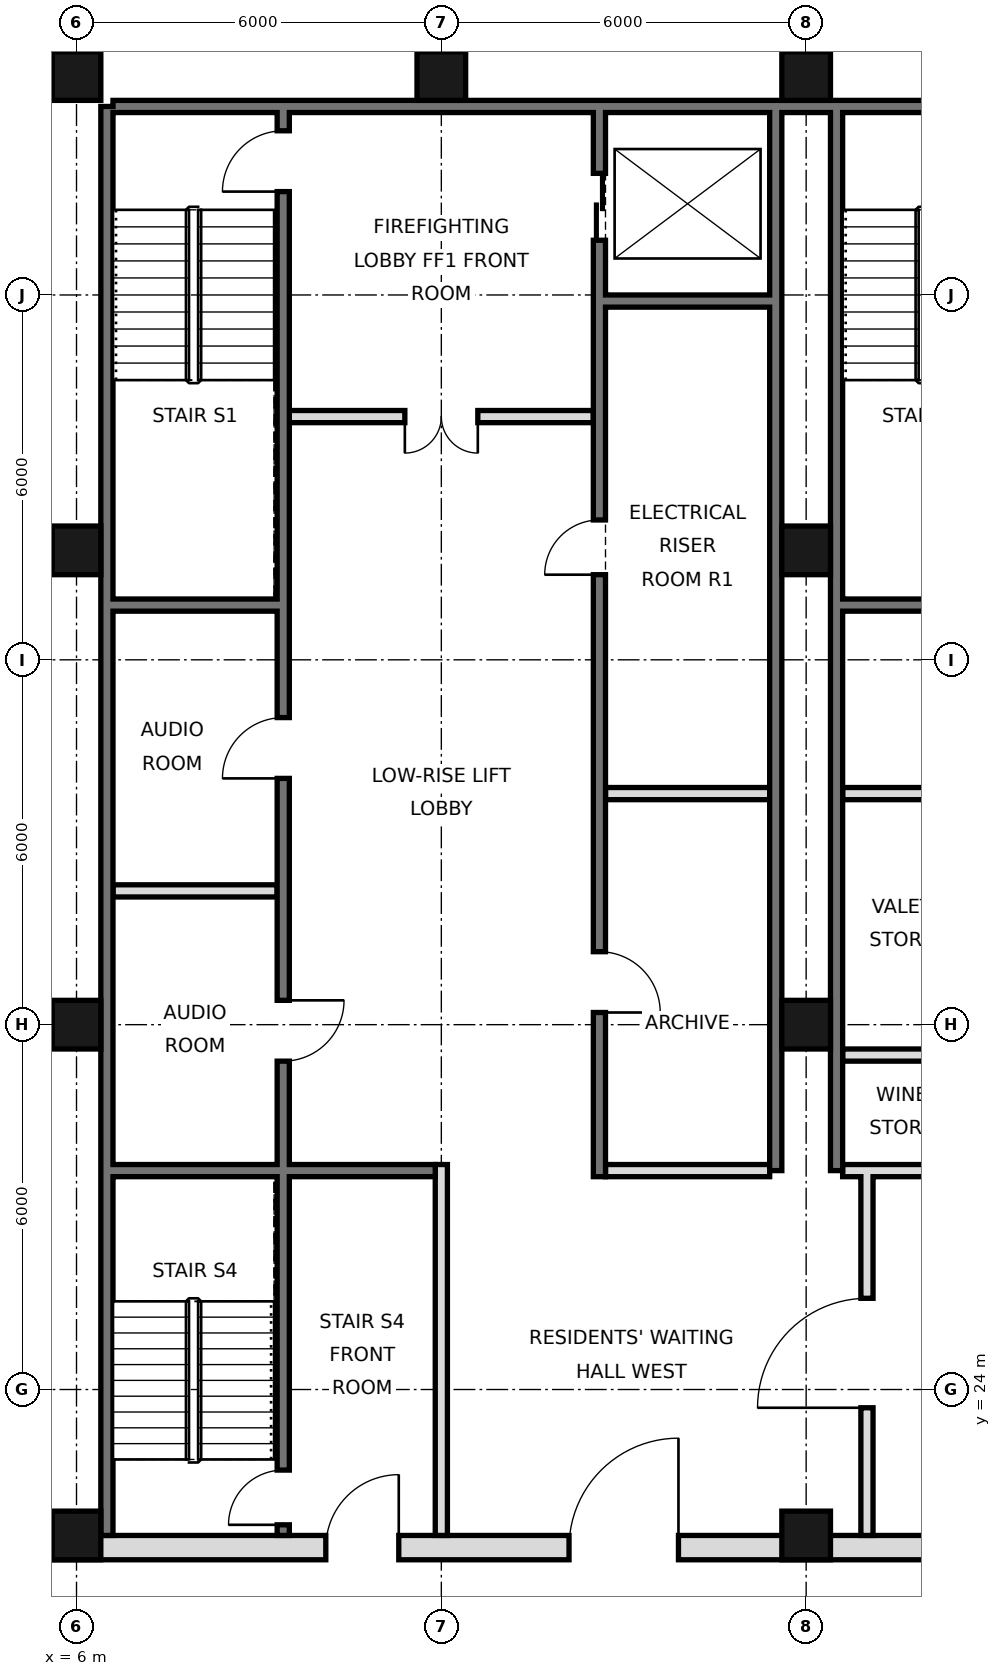
"""IFC4 building model, lengths in metres.
Left out: names, types, materials, properties, quantities, classifications, styles, units other than length and angle.
Written with IfcOpenShell. Run it as: python <this file> out.ifc"""

import sys

from ifc_helpers import new_model, si_unit, direction, frame, frame_2d, origin, origin_2d, place, context, subcontext, project, spatial, rectangle, hollow_rectangle, extrude, element, fill, save


model = new_model("IFC4")
c1 = context("Model", 3, precision=1e-05, world=origin(), true_north=direction((0.0, 1.0)))
c2 = subcontext(c1, "Body", "Model", "MODEL_VIEW")
j1 = project(units=[si_unit("LENGTHUNIT", "METRE"), si_unit("PLANEANGLEUNIT", "RADIAN")], contexts=[c1])
p1 = place(None, origin())
s1 = spatial("IfcSite", under=j1, at=p1, CompositionType="ELEMENT")
p2 = place(p1, origin())
s2 = spatial("IfcBuilding", under=s1, at=p2, CompositionType="ELEMENT")
p3 = place(p2, frame((0.0, 0.0, 305.2)))
s3 = spatial("IfcBuildingStorey", under=s2, at=p3, CompositionType="ELEMENT", Elevation=305.2)
for number, where, z_axis, x_axis in (
    (1, (6.0, 21.6, 0.0), (0.0, 0.0, 1.0), (1.0, 0.0, 0.0)),
    (2, (6.0, 30.0, 0.0), (0.0, 0.0, 1.0), (1.0, 0.0, 0.0)),
    (3, (6.0, 37.8, 0.0), (0.0, 0.0, 1.0), (1.0, 0.0, 0.0)),
    (4, (6.0, 45.6, 0.0), (0.0, 0.0, 1.0), (1.0, 0.0, 0.0)),
    (5, (12.0, 45.6, 0.0), (0.0, 0.0, 1.0), (1.0, 0.0, 0.0)),
    (6, (18.0, 21.6, 0.0), (0.0, 0.0, 1.0), (1.0, 0.0, 0.0)),
    (7, (18.0, 30.0, 0.0), (0.0, 0.0, 1.0), (1.0, 0.0, 0.0)),
    (8, (18.0, 37.8, 0.0), (0.0, 0.0, 1.0), (1.0, 0.0, 0.0)),
    (9, (18.0, 45.6, 0.0), (0.0, 0.0, 1.0), (1.0, 0.0, 0.0)),
):
    element("IfcColumn", number, at=place(p3, frame(where, z_axis=z_axis, x_axis=x_axis)), inside=s3, PredefinedType="COLUMN", context=c2, shape_type="SweptSolid", body=[
        extrude(hollow_rectangle(XDim=0.8, YDim=0.8, WallThickness=0.025, at=origin_2d()), origin(), (0.0, 0.0, 1.0), 3.6),
    ])
p4 = place(p3, frame((6.5, 21.6, 0.0), z_axis=(0.0, 0.0, 1.0), x_axis=(0.0, 1.0, 0.0)))
e10 = element("IfcWall", 10, at=p4, inside=s3, PredefinedType="SOLIDWALL", context=c2, shape_type="SweptSolid", body=[
    extrude(rectangle(XDim=23.5, YDim=0.2, at=frame_2d((11.75, 0.0))), origin(), (0.0, 0.0, 1.0), 3.42),
])
p5 = place(p3, frame((6.6, 45.1, 0.0), z_axis=(0.0, 0.0, 1.0), x_axis=(1.0, 0.0, 0.0)))
e11 = element("IfcWall", 11, at=p5, inside=s3, PredefinedType="SOLIDWALL", context=c2, shape_type="SweptSolid", body=[
    extrude(rectangle(XDim=34.8, YDim=0.2, at=frame_2d((17.4, 0.0))), origin(), (0.0, 0.0, 1.0), 3.42),
])
for number, where, z_axis, x_axis in (
    (12, (17.5, 27.6, 0.0), (0.0, 0.0, 1.0), (0.0, 1.0, 0.0)),
    (13, (18.5, 27.6, 0.0), (0.0, 0.0, 1.0), (0.0, 1.0, 0.0)),
):
    element("IfcWall", number, at=place(p3, frame(where, z_axis=z_axis, x_axis=x_axis)), inside=s3, PredefinedType="SOLIDWALL", context=c2, shape_type="SweptSolid", body=[
        extrude(rectangle(XDim=17.5, YDim=0.2, at=frame_2d((8.75, 0.0))), origin(), (0.0, 0.0, 1.0), 3.42),
    ])
p6 = place(p3, frame((5.6, 21.4, 0.0), z_axis=(0.0, 0.0, 1.0), x_axis=(1.0, 0.0, 0.0)))
e14 = element("IfcWall", 14, at=p6, inside=s3, PredefinedType="SOLIDWALL", context=c2, shape_type="SweptSolid", body=[
    extrude(rectangle(XDim=36.8, YDim=0.4, at=frame_2d((18.4, 0.0))), origin(), (0.0, 0.0, 1.0), 3.42),
])
p7 = place(p6, frame((8.5, 0.0, 0.0)))
e15 = element("IfcOpeningElement", 15, at=p7, cuts=e14, PredefinedType="OPENING", context=c2, shape_type="SweptSolid", body=[
    extrude(rectangle(XDim=1.8, YDim=2.1, at=frame_2d((0.9, 1.05))), frame((0.0, 0.21, 0.0), z_axis=(0.0, -1.0, 0.0), x_axis=(1.0, 0.0, 0.0)), (0.0, 0.0, 1.0), 0.42),
])
p8 = place(p6, frame((17.5, 0.0, 0.0)))
e16 = element("IfcOpeningElement", 16, at=p8, cuts=e14, PredefinedType="OPENING", context=c2, shape_type="SweptSolid", body=[
    extrude(rectangle(XDim=1.8, YDim=2.1, at=frame_2d((0.9, 1.05))), frame((0.0, 0.21, 0.0), z_axis=(0.0, -1.0, 0.0), x_axis=(1.0, 0.0, 0.0)), (0.0, 0.0, 1.0), 0.42),
])
p9 = place(p6, frame((26.5, 0.0, 0.0)))
e17 = element("IfcOpeningElement", 17, at=p9, cuts=e14, PredefinedType="OPENING", context=c2, shape_type="SweptSolid", body=[
    extrude(rectangle(XDim=1.8, YDim=2.1, at=frame_2d((0.9, 1.05))), frame((0.0, 0.21, 0.0), z_axis=(0.0, -1.0, 0.0), x_axis=(1.0, 0.0, 0.0)), (0.0, 0.0, 1.0), 0.42),
])
p10 = place(p6, frame((4.5, 0.0, 0.0)))
e18 = element("IfcOpeningElement", 18, at=p10, cuts=e14, PredefinedType="OPENING", context=c2, shape_type="SweptSolid", body=[
    extrude(rectangle(XDim=1.2, YDim=2.1, at=frame_2d((0.6, 1.05))), frame((0.0, 0.21, 0.0), z_axis=(0.0, -1.0, 0.0), x_axis=(1.0, 0.0, 0.0)), (0.0, 0.0, 1.0), 0.42),
])
p11 = place(p6, frame((31.1, 0.0, 0.0)))
e19 = element("IfcOpeningElement", 19, at=p11, cuts=e14, PredefinedType="OPENING", context=c2, shape_type="SweptSolid", body=[
    extrude(rectangle(XDim=1.2, YDim=2.1, at=frame_2d((0.6, 1.05))), frame((0.0, 0.21, 0.0), z_axis=(0.0, -1.0, 0.0), x_axis=(1.0, 0.0, 0.0)), (0.0, 0.0, 1.0), 0.42),
])
p12 = place(p3, frame((19.0, 21.6, 0.0), z_axis=(0.0, 0.0, 1.0), x_axis=(0.0, 1.0, 0.0)))
e20 = element("IfcWall", 20, at=p12, inside=s3, PredefinedType="PARTITIONING", context=c2, shape_type="SweptSolid", body=[
    extrude(rectangle(XDim=6.0, YDim=0.2, at=frame_2d((3.0, 0.0))), origin(), (0.0, 0.0, 1.0), 3.42),
])
p13 = place(p12, frame((2.1, 0.0, 0.0)))
e21 = element("IfcOpeningElement", 21, at=p13, cuts=e20, PredefinedType="OPENING", context=c2, shape_type="SweptSolid", body=[
    extrude(rectangle(XDim=1.8, YDim=2.1, at=frame_2d((0.9, 1.05))), frame((0.0, 0.11, 0.0), z_axis=(0.0, -1.0, 0.0), x_axis=(1.0, 0.0, 0.0)), (0.0, 0.0, 1.0), 0.22),
])
p14 = place(p3, frame((12.0, 21.6, 0.0), z_axis=(0.0, 0.0, 1.0), x_axis=(0.0, 1.0, 0.0)))
e22 = element("IfcWall", 22, at=p14, inside=s3, PredefinedType="PARTITIONING", context=c2, shape_type="SweptSolid", body=[
    extrude(rectangle(XDim=6.1, YDim=0.2, at=frame_2d((3.05, 0.0))), origin(), (0.0, 0.0, 1.0), 3.42),
])
p15 = place(p3, frame((14.6, 27.5, 0.0), z_axis=(0.0, 0.0, 1.0), x_axis=(0.0, 1.0, 0.0)))
e23 = element("IfcWall", 23, at=p15, inside=s3, PredefinedType="SOLIDWALL", context=c2, shape_type="SweptSolid", body=[
    extrude(rectangle(XDim=17.5, YDim=0.2, at=frame_2d((8.75, 0.0))), origin(), (0.0, 0.0, 1.0), 3.42),
])
p16 = place(p15, frame((15.4, 0.0, 0.0)))
e24 = element("IfcOpeningElement", 24, at=p16, cuts=e23, PredefinedType="OPENING", context=c2, shape_type="SweptSolid", body=[
    extrude(rectangle(XDim=1.1, YDim=2.1, at=frame_2d((0.55, 1.05))), frame((0.0, 0.11, 0.0), z_axis=(0.0, -1.0, 0.0), x_axis=(1.0, 0.0, 0.0)), (0.0, 0.0, 1.0), 0.22),
])
p17 = place(p15, frame((2.7, 0.0, 0.0)))
e25 = element("IfcOpeningElement", 25, at=p17, cuts=e23, PredefinedType="OPENING", context=c2, shape_type="SweptSolid", body=[
    extrude(rectangle(XDim=1.0, YDim=2.1, at=frame_2d((0.5, 1.05))), frame((0.0, 0.11, 0.0), z_axis=(0.0, -1.0, 0.0), x_axis=(1.0, 0.0, 0.0)), (0.0, 0.0, 1.0), 0.22),
])
p18 = place(p15, frame((9.9, 0.0, 0.0)))
e26 = element("IfcOpeningElement", 26, at=p18, cuts=e23, PredefinedType="OPENING", context=c2, shape_type="SweptSolid", body=[
    extrude(rectangle(XDim=0.9, YDim=2.1, at=frame_2d((0.45, 1.05))), frame((0.0, 0.11, 0.0), z_axis=(0.0, -1.0, 0.0), x_axis=(1.0, 0.0, 0.0)), (0.0, 0.0, 1.0), 0.22),
])
p19 = place(p3, frame((9.4, 21.6, 0.0), z_axis=(0.0, 0.0, 1.0), x_axis=(0.0, 1.0, 0.0)))
e27 = element("IfcWall", 27, at=p19, inside=s3, PredefinedType="SOLIDWALL", context=c2, shape_type="SweptSolid", body=[
    extrude(rectangle(XDim=23.4, YDim=0.2, at=frame_2d((11.7, 0.0))), origin(), (0.0, 0.0, 1.0), 3.42),
])
p20 = place(p19, frame((7.8, 0.0, 0.0)))
e28 = element("IfcOpeningElement", 28, at=p20, cuts=e27, PredefinedType="OPENING", context=c2, shape_type="SweptSolid", body=[
    extrude(rectangle(XDim=1.0, YDim=2.1, at=frame_2d((0.5, 1.05))), frame((0.0, 0.11, 0.0), z_axis=(0.0, -1.0, 0.0), x_axis=(1.0, 0.0, 0.0)), (0.0, 0.0, 1.0), 0.22),
])
p21 = place(p19, frame((12.45, 0.0, 0.0)))
e29 = element("IfcOpeningElement", 29, at=p21, cuts=e27, PredefinedType="OPENING", context=c2, shape_type="SweptSolid", body=[
    extrude(rectangle(XDim=1.0, YDim=2.1, at=frame_2d((0.5, 1.05))), frame((0.0, 0.11, 0.0), z_axis=(0.0, -1.0, 0.0), x_axis=(1.0, 0.0, 0.0)), (0.0, 0.0, 1.0), 0.22),
])
p22 = place(p19, frame((22.1, 0.0, 0.0)))
e30 = element("IfcOpeningElement", 30, at=p22, cuts=e27, PredefinedType="OPENING", context=c2, shape_type="SweptSolid", body=[
    extrude(rectangle(XDim=1.0, YDim=2.1, at=frame_2d((0.5, 1.05))), frame((0.0, 0.11, 0.0), z_axis=(0.0, -1.0, 0.0), x_axis=(1.0, 0.0, 0.0)), (0.0, 0.0, 1.0), 0.22),
])
p23 = place(p19, frame((0.175, 0.0, 0.0)))
e31 = element("IfcOpeningElement", 31, at=p23, cuts=e27, PredefinedType="OPENING", context=c2, shape_type="SweptSolid", body=[
    extrude(rectangle(XDim=0.9, YDim=2.1, at=frame_2d((0.45, 1.05))), frame((0.0, 0.11, 0.0), z_axis=(0.0, -1.0, 0.0), x_axis=(1.0, 0.0, 0.0)), (0.0, 0.0, 1.0), 0.22),
])
for number, where, z_axis, x_axis in (
    (32, (14.7, 27.6, 0.0), (0.0, 0.0, 1.0), (1.0, 0.0, 0.0)),
    (33, (18.6, 27.6, 0.0), (0.0, 0.0, 1.0), (1.0, 0.0, 0.0)),
):
    element("IfcWall", number, at=place(p3, frame(where, z_axis=z_axis, x_axis=x_axis)), inside=s3, PredefinedType="PARTITIONING", context=c2, shape_type="SweptSolid", body=[
        extrude(rectangle(XDim=2.7, YDim=0.2, at=frame_2d((1.35, 0.0))), origin(), (0.0, 0.0, 1.0), 3.42),
    ])
p24 = place(p3, frame((6.6, 27.6, 0.0), z_axis=(0.0, 0.0, 1.0), x_axis=(1.0, 0.0, 0.0)))
e34 = element("IfcWall", 34, at=p24, inside=s3, PredefinedType="SOLIDWALL", context=c2, shape_type="SweptSolid", body=[
    extrude(rectangle(XDim=5.3, YDim=0.2, at=frame_2d((2.65, 0.0))), origin(), (0.0, 0.0, 1.0), 3.42),
])
for number, where, z_axis, x_axis in (
    (35, (18.6, 29.5, 0.0), (0.0, 0.0, 1.0), (1.0, 0.0, 0.0)),
    (36, (6.6, 32.2, 0.0), (0.0, 0.0, 1.0), (1.0, 0.0, 0.0)),
):
    element("IfcWall", number, at=place(p3, frame(where, z_axis=z_axis, x_axis=x_axis)), inside=s3, PredefinedType="PARTITIONING", context=c2, shape_type="SweptSolid", body=[
        extrude(rectangle(XDim=2.7, YDim=0.2, at=frame_2d((1.35, 0.0))), origin(), (0.0, 0.0, 1.0), 3.42),
    ])
for number, where, z_axis, x_axis in (
    (37, (14.7, 33.8, 0.0), (0.0, 0.0, 1.0), (1.0, 0.0, 0.0)),
    (38, (18.6, 33.8, 0.0), (0.0, 0.0, 1.0), (1.0, 0.0, 0.0)),
    (39, (18.6, 36.9, 0.0), (0.0, 0.0, 1.0), (1.0, 0.0, 0.0)),
    (40, (6.6, 36.9, 0.0), (0.0, 0.0, 1.0), (1.0, 0.0, 0.0)),
):
    element("IfcWall", number, at=place(p3, frame(where, z_axis=z_axis, x_axis=x_axis)), inside=s3, PredefinedType="SOLIDWALL", context=c2, shape_type="SweptSolid", body=[
        extrude(rectangle(XDim=2.7, YDim=0.2, at=frame_2d((1.35, 0.0))), origin(), (0.0, 0.0, 1.0), 3.42),
    ])
p25 = place(p3, frame((9.5, 40.0, 0.0), z_axis=(0.0, 0.0, 1.0), x_axis=(1.0, 0.0, 0.0)))
e41 = element("IfcWall", 41, at=p25, inside=s3, PredefinedType="PARTITIONING", context=c2, shape_type="SweptSolid", body=[
    extrude(rectangle(XDim=5.0, YDim=0.2, at=frame_2d((2.5, 0.0))), origin(), (0.0, 0.0, 1.0), 3.42),
])
p26 = place(p25, frame((1.9, 0.0, 0.0)))
e42 = element("IfcOpeningElement", 42, at=p26, cuts=e41, PredefinedType="OPENING", context=c2, shape_type="SweptSolid", body=[
    extrude(rectangle(XDim=1.2, YDim=2.1, at=frame_2d((0.6, 1.05))), frame((0.0, 0.11, 0.0), z_axis=(0.0, -1.0, 0.0), x_axis=(1.0, 0.0, 0.0)), (0.0, 0.0, 1.0), 0.22),
])
p27 = place(p3, frame((14.7, 41.9, 0.0), z_axis=(0.0, 0.0, 1.0), x_axis=(1.0, 0.0, 0.0)))
e43 = element("IfcWall", 43, at=p27, inside=s3, PredefinedType="SOLIDWALL", context=c2, shape_type="SweptSolid", body=[
    extrude(rectangle(XDim=2.7, YDim=0.2, at=frame_2d((1.35, 0.0))), origin(), (0.0, 0.0, 1.0), 3.42),
])
p28 = place(p7, frame((1.8, 0.0, 0.0), z_axis=(0.0, 0.0, 1.0), x_axis=(-1.0, 0.0, 0.0)))
e44 = element("IfcDoor", 44, at=p28, inside=s3, OperationType="SINGLE_SWING_LEFT", PredefinedType="DOOR", context=c2, shape_type="SweptSolid", body=[
    extrude(rectangle(XDim=1.8, YDim=2.1, at=frame_2d((0.9, 1.05))), frame((0.0, 0.025, 0.0), z_axis=(0.0, -1.0, 0.0), x_axis=(1.0, 0.0, 0.0)), (0.0, 0.0, 1.0), 0.05),
])
fill(e15, e44)
p29 = place(p13, origin())
e45 = element("IfcDoor", 45, at=p29, inside=s3, OperationType="SINGLE_SWING_LEFT", PredefinedType="DOOR", context=c2, shape_type="SweptSolid", body=[
    extrude(rectangle(XDim=1.8, YDim=2.1, at=frame_2d((0.9, 1.05))), frame((0.0, 0.025, 0.0), z_axis=(0.0, -1.0, 0.0), x_axis=(1.0, 0.0, 0.0)), (0.0, 0.0, 1.0), 0.05),
])
fill(e21, e45)
p30 = place(p10, frame((1.2, 0.0, 0.0), z_axis=(0.0, 0.0, 1.0), x_axis=(-1.0, 0.0, 0.0)))
e46 = element("IfcDoor", 46, at=p30, inside=s3, OperationType="SINGLE_SWING_LEFT", PredefinedType="DOOR", context=c2, shape_type="SweptSolid", body=[
    extrude(rectangle(XDim=1.2, YDim=2.1, at=frame_2d((0.6, 1.05))), frame((0.0, 0.025, 0.0), z_axis=(0.0, -1.0, 0.0), x_axis=(1.0, 0.0, 0.0)), (0.0, 0.0, 1.0), 0.05),
])
fill(e18, e46)
p31 = place(p26, frame((1.2, 0.0, 0.0), z_axis=(0.0, 0.0, 1.0), x_axis=(-1.0, 0.0, 0.0)))
e47 = element("IfcDoor", 47, at=p31, inside=s3, OperationType="DOUBLE_DOOR_SINGLE_SWING", PredefinedType="DOOR", context=c2, shape_type="SweptSolid", body=[
    extrude(rectangle(XDim=1.2, YDim=2.1, at=frame_2d((0.6, 1.05))), frame((0.0, 0.025, 0.0), z_axis=(0.0, -1.0, 0.0), x_axis=(1.0, 0.0, 0.0)), (0.0, 0.0, 1.0), 0.05),
])
fill(e42, e47)
p32 = place(p16, origin())
e48 = element("IfcDoor", 48, at=p32, inside=s3, OperationType="DOUBLE_DOOR_SLIDING", PredefinedType="DOOR", context=c2, shape_type="SweptSolid", body=[
    extrude(rectangle(XDim=1.1, YDim=2.1, at=frame_2d((0.55, 1.05))), frame((0.0, 0.025, 0.0), z_axis=(0.0, -1.0, 0.0), x_axis=(1.0, 0.0, 0.0)), (0.0, 0.0, 1.0), 0.05),
])
fill(e24, e48)
p33 = place(p17, frame((1.0, 0.0, 0.0), z_axis=(0.0, 0.0, 1.0), x_axis=(-1.0, 0.0, 0.0)))
e49 = element("IfcDoor", 49, at=p33, inside=s3, OperationType="SINGLE_SWING_RIGHT", PredefinedType="DOOR", context=c2, shape_type="SweptSolid", body=[
    extrude(rectangle(XDim=1.0, YDim=2.1, at=frame_2d((0.5, 1.05))), frame((0.0, 0.025, 0.0), z_axis=(0.0, -1.0, 0.0), x_axis=(1.0, 0.0, 0.0)), (0.0, 0.0, 1.0), 0.05),
])
fill(e25, e49)
p34 = place(p20, origin())
e50 = element("IfcDoor", 50, at=p34, inside=s3, OperationType="SINGLE_SWING_RIGHT", PredefinedType="DOOR", context=c2, shape_type="SweptSolid", body=[
    extrude(rectangle(XDim=1.0, YDim=2.1, at=frame_2d((0.5, 1.05))), frame((0.0, 0.025, 0.0), z_axis=(0.0, -1.0, 0.0), x_axis=(1.0, 0.0, 0.0)), (0.0, 0.0, 1.0), 0.05),
])
fill(e28, e50)
p35 = place(p21, origin())
e51 = element("IfcDoor", 51, at=p35, inside=s3, OperationType="SINGLE_SWING_LEFT", PredefinedType="DOOR", context=c2, shape_type="SweptSolid", body=[
    extrude(rectangle(XDim=1.0, YDim=2.1, at=frame_2d((0.5, 1.05))), frame((0.0, 0.025, 0.0), z_axis=(0.0, -1.0, 0.0), x_axis=(1.0, 0.0, 0.0)), (0.0, 0.0, 1.0), 0.05),
])
fill(e29, e51)
p36 = place(p22, origin())
e52 = element("IfcDoor", 52, at=p36, inside=s3, OperationType="SINGLE_SWING_LEFT", PredefinedType="DOOR", context=c2, shape_type="SweptSolid", body=[
    extrude(rectangle(XDim=1.0, YDim=2.1, at=frame_2d((0.5, 1.05))), frame((0.0, 0.025, 0.0), z_axis=(0.0, -1.0, 0.0), x_axis=(1.0, 0.0, 0.0)), (0.0, 0.0, 1.0), 0.05),
])
fill(e30, e52)
p37 = place(p23, origin())
e53 = element("IfcDoor", 53, at=p37, inside=s3, OperationType="SINGLE_SWING_LEFT", PredefinedType="DOOR", context=c2, shape_type="SweptSolid", body=[
    extrude(rectangle(XDim=0.9, YDim=2.1, at=frame_2d((0.45, 1.05))), frame((0.0, 0.025, 0.0), z_axis=(0.0, -1.0, 0.0), x_axis=(1.0, 0.0, 0.0)), (0.0, 0.0, 1.0), 0.05),
])
fill(e31, e53)
p38 = place(p18, origin())
e54 = element("IfcDoor", 54, at=p38, inside=s3, OperationType="SINGLE_SWING_LEFT", PredefinedType="DOOR", context=c2, shape_type="SweptSolid", body=[
    extrude(rectangle(XDim=0.9, YDim=2.1, at=frame_2d((0.45, 1.05))), frame((0.0, 0.025, 0.0), z_axis=(0.0, -1.0, 0.0), x_axis=(1.0, 0.0, 0.0)), (0.0, 0.0, 1.0), 0.05),
])
fill(e26, e54)
save(model, sys.argv[1])
